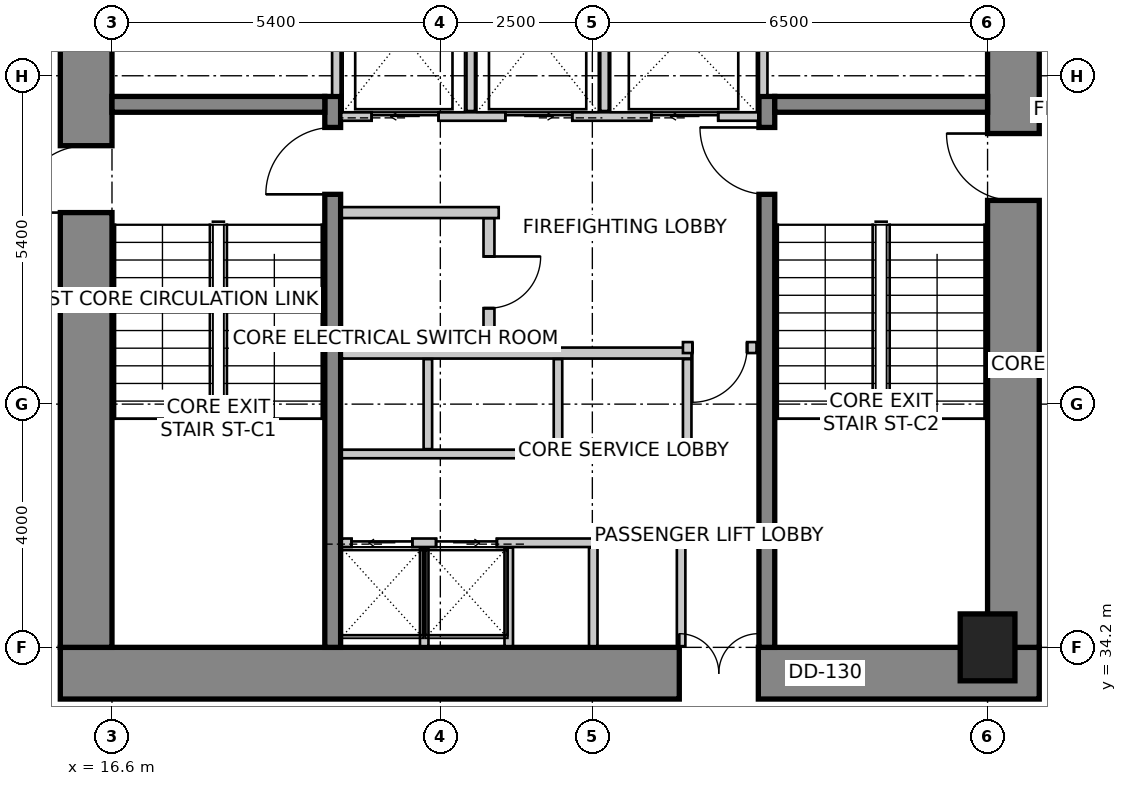
"""IFC4 building model, lengths in metres.
Left out: names, types, materials, properties, quantities, classifications, styles, units other than length and angle.
Written with IfcOpenShell. Run it as: python <this file> out.ifc"""

import sys

from ifc_helpers import new_model, si_unit, direction, frame, frame_2d, origin, origin_2d, place, context, subcontext, project, spatial, rectangle, extrude, source, transform, mapped, element, fill, save


model = new_model("IFC4")
c1 = context("Model", 3, precision=1e-05, world=origin(), true_north=direction((0.0, 1.0)))
c2 = subcontext(c1, "Body", "Model", "MODEL_VIEW")
j1 = project(units=[si_unit("LENGTHUNIT", "METRE"), si_unit("PLANEANGLEUNIT", "RADIAN")], contexts=[c1])
p1 = place(None, origin())
s1 = spatial("IfcSite", under=j1, at=p1, CompositionType="ELEMENT")
p2 = place(p1, origin())
s2 = spatial("IfcBuilding", under=s1, at=p2, CompositionType="ELEMENT")
p3 = place(p2, frame((0.0, 0.0, 51.0)))
s3 = spatial("IfcBuildingStorey", under=s2, at=p3, CompositionType="ELEMENT", Elevation=51.0)
p4 = place(p3, frame((15.75, 33.775, 0.0), z_axis=(0.0, 0.0, 1.0), x_axis=(1.0, 0.0, 0.0)))
e1 = element("IfcWall", 1, at=p4, inside=s3, PredefinedType="SHEAR", context=c2, shape_type="SweptSolid", body=[
    extrude(rectangle(XDim=16.1, YDim=0.85, at=frame_2d((8.05, 0.0))), origin(), (0.0, 0.0, 1.0), 4.0),
])
m1 = source(origin(), c2, "Body", "SweptSolid", [
    extrude(rectangle(XDim=1.3, YDim=2.15, at=frame_2d((0.65, 1.075))), frame((0.0, 0.435, 0.0), z_axis=(0.0, -1.0, 0.0), x_axis=(1.0, 0.0, 0.0)), (0.0, 0.0, 1.0), 0.87),
])
p5 = place(p4, frame((10.18, 0.0, 0.0)))
e2 = element("IfcOpeningElement", 2, at=p5, cuts=e1, PredefinedType="OPENING", context=c2, shape_type="MappedRepresentation", body=[
    mapped(m1, transform((0.0, 0.0, 0.0), scale=1.0)),
])
p6 = place(p3, frame((16.175, 34.2, 0.0), z_axis=(0.0, 0.0, 1.0), x_axis=(0.0, 1.0, 0.0)))
e3 = element("IfcWall", 3, at=p6, inside=s3, PredefinedType="SHEAR", context=c2, shape_type="SweptSolid", body=[
    extrude(rectangle(XDim=11.4, YDim=0.85, at=frame_2d((5.7, 0.0))), origin(), (0.0, 0.0, 1.0), 4.0),
])
m2 = source(origin(), c2, "Body", "SweptSolid", [
    extrude(rectangle(XDim=1.1, YDim=2.15, at=frame_2d((0.55, 1.075))), frame((0.0, 0.435, 0.0), z_axis=(0.0, -1.0, 0.0), x_axis=(1.0, 0.0, 0.0)), (0.0, 0.0, 1.0), 0.87),
])
p7 = place(p6, frame((7.15, 0.0, 0.0)))
e4 = element("IfcOpeningElement", 4, at=p7, cuts=e3, PredefinedType="OPENING", context=c2, shape_type="MappedRepresentation", body=[
    mapped(m2, transform((0.0, 0.0, 0.0), scale=1.0)),
])
p8 = place(p3, frame((31.425, 34.2, 0.0), z_axis=(0.0, 0.0, 1.0), x_axis=(0.0, 1.0, 0.0)))
e5 = element("IfcWall", 5, at=p8, inside=s3, PredefinedType="SHEAR", context=c2, shape_type="SweptSolid", body=[
    extrude(rectangle(XDim=11.4, YDim=0.85, at=frame_2d((5.7, 0.0))), origin(), (0.0, 0.0, 1.0), 4.0),
])
p9 = place(p8, frame((7.35, 0.0, 0.0)))
e6 = element("IfcOpeningElement", 6, at=p9, cuts=e5, PredefinedType="OPENING", context=c2, shape_type="MappedRepresentation", body=[
    mapped(m2, transform((0.0, 0.0, 0.0), scale=1.0)),
])
p10 = place(p3, frame((20.23, 34.2, 0.0), z_axis=(0.0, 0.0, 1.0), x_axis=(0.0, 1.0, 0.0)))
e7 = element("IfcWall", 7, at=p10, inside=s3, PredefinedType="SHEAR", context=c2, shape_type="SweptSolid", body=[
    extrude(rectangle(XDim=9.06, YDim=0.26, at=frame_2d((4.53, 0.0))), origin(), (0.0, 0.0, 1.0), 4.0),
])
m3 = source(origin(), c2, "Body", "SweptSolid", [
    extrude(rectangle(XDim=1.1, YDim=2.15, at=frame_2d((0.55, 1.075))), frame((0.0, 0.14, 0.0), z_axis=(0.0, -1.0, 0.0), x_axis=(1.0, 0.0, 0.0)), (0.0, 0.0, 1.0), 0.28),
])
p11 = place(p10, frame((7.45, 0.0, 0.0)))
e8 = element("IfcOpeningElement", 8, at=p11, cuts=e7, PredefinedType="OPENING", context=c2, shape_type="MappedRepresentation", body=[
    mapped(m3, transform((0.0, 0.0, 0.0), scale=1.0)),
])
p12 = place(p3, frame((27.37, 34.2, 0.0), z_axis=(0.0, 0.0, 1.0), x_axis=(0.0, 1.0, 0.0)))
e9 = element("IfcWall", 9, at=p12, inside=s3, PredefinedType="SHEAR", context=c2, shape_type="SweptSolid", body=[
    extrude(rectangle(XDim=9.06, YDim=0.26, at=frame_2d((4.53, 0.0))), origin(), (0.0, 0.0, 1.0), 4.0),
])
p13 = place(p12, frame((7.45, 0.0, 0.0)))
e10 = element("IfcOpeningElement", 10, at=p13, cuts=e9, PredefinedType="OPENING", context=c2, shape_type="MappedRepresentation", body=[
    mapped(m3, transform((0.0, 0.0, 0.0), scale=1.0)),
])
for number, where, z_axis, x_axis in (
    (11, (16.6, 43.13, 0.0), (0.0, 0.0, 1.0), (1.0, 0.0, 0.0)),
    (12, (27.5, 43.13, 0.0), (0.0, 0.0, 1.0), (1.0, 0.0, 0.0)),
):
    element("IfcWall", number, at=place(p3, frame(where, z_axis=z_axis, x_axis=x_axis)), inside=s3, PredefinedType="SHEAR", context=c2, shape_type="SweptSolid", body=[
        extrude(rectangle(XDim=3.5, YDim=0.26, at=frame_2d((1.75, 0.0))), origin(), (0.0, 0.0, 1.0), 4.0),
    ])
m4 = source(origin(), c2, "Body", "SweptSolid", [
    extrude(rectangle(XDim=0.9, YDim=1.1, at=origin_2d()), origin(), (0.0, 0.0, 1.0), 4.0),
])
p14 = place(p3, frame((31.0, 34.2, 0.0), z_axis=(0.0, 0.0, 1.0), x_axis=(1.0, 0.0, 0.0)))
e13 = element("IfcColumn", 13, at=p14, inside=s3, PredefinedType="COLUMN", context=c2, shape_type="MappedRepresentation", body=[
    mapped(m4, transform((0.0, 0.0, 0.0), scale=1.0)),
])
p15 = place(p3, frame((20.37, 42.93, 0.0), z_axis=(0.0, 0.0, 1.0), x_axis=(1.0, 0.0, 0.0)))
e14 = element("IfcWall", 14, at=p15, inside=s3, PredefinedType="SOLIDWALL", context=c2, shape_type="SweptSolid", body=[
    extrude(rectangle(XDim=6.86, YDim=0.14, at=frame_2d((3.43, 0.0))), origin(), (0.0, 0.0, 1.0), 3.75),
])
m5 = source(origin(), c2, "Body", "SweptSolid", [
    extrude(rectangle(XDim=1.1, YDim=2.15, at=frame_2d((0.55, 1.075))), frame((0.0, 0.08, 0.0), z_axis=(0.0, -1.0, 0.0), x_axis=(1.0, 0.0, 0.0)), (0.0, 0.0, 1.0), 0.16),
])
p16 = place(p15, frame((0.5, 0.0, 0.0)))
e15 = element("IfcOpeningElement", 15, at=p16, cuts=e14, PredefinedType="OPENING", context=c2, shape_type="MappedRepresentation", body=[
    mapped(m5, transform((0.0, 0.0, 0.0), scale=1.0)),
])
p17 = place(p15, frame((2.7, 0.0, 0.0)))
e16 = element("IfcOpeningElement", 16, at=p17, cuts=e14, PredefinedType="OPENING", context=c2, shape_type="MappedRepresentation", body=[
    mapped(m5, transform((0.0, 0.0, 0.0), scale=1.0)),
])
p18 = place(p15, frame((5.1, 0.0, 0.0)))
e17 = element("IfcOpeningElement", 17, at=p18, cuts=e14, PredefinedType="OPENING", context=c2, shape_type="MappedRepresentation", body=[
    mapped(m5, transform((0.0, 0.0, 0.0), scale=1.0)),
])
for number, where, z_axis, x_axis in (
    (18, (20.29, 43.28, 0.0), (0.0, 0.0, 1.0), (0.0, 1.0, 0.0)),
    (19, (27.31, 43.28, 0.0), (0.0, 0.0, 1.0), (0.0, 1.0, 0.0)),
):
    element("IfcWall", number, at=place(p3, frame(where, z_axis=z_axis, x_axis=x_axis)), inside=s3, PredefinedType="SOLIDWALL", context=c2, shape_type="SweptSolid", body=[
        extrude(rectangle(XDim=2.3, YDim=0.14, at=frame_2d((1.15, 0.0))), origin(), (0.0, 0.0, 1.0), 3.75),
    ])
for number, where, z_axis, x_axis in (
    (20, (22.5, 43.02, 0.0), (0.0, 0.0, 1.0), (0.0, 1.0, 0.0)),
    (21, (24.7, 43.02, 0.0), (0.0, 0.0, 1.0), (0.0, 1.0, 0.0)),
):
    element("IfcWall", number, at=place(p3, frame(where, z_axis=z_axis, x_axis=x_axis)), inside=s3, PredefinedType="SOLIDWALL", context=c2, shape_type="SweptSolid", body=[
        extrude(rectangle(XDim=2.56, YDim=0.14, at=frame_2d((1.28, 0.0))), origin(), (0.0, 0.0, 1.0), 3.75),
    ])
p19 = place(p3, frame((20.38, 35.92, 0.0), z_axis=(0.0, 0.0, 1.0), x_axis=(1.0, 0.0, 0.0)))
e22 = element("IfcWall", 22, at=p19, inside=s3, PredefinedType="SOLIDWALL", context=c2, shape_type="SweptSolid", body=[
    extrude(rectangle(XDim=5.65, YDim=0.14, at=frame_2d((2.825, 0.0))), origin(), (0.0, 0.0, 1.0), 3.75),
])
m6 = source(origin(), c2, "Body", "SweptSolid", [
    extrude(rectangle(XDim=1.0, YDim=2.15, at=frame_2d((0.5, 1.075))), frame((0.0, 0.08, 0.0), z_axis=(0.0, -1.0, 0.0), x_axis=(1.0, 0.0, 0.0)), (0.0, 0.0, 1.0), 0.16),
])
p20 = place(p19, frame((0.16, 0.0, 0.0)))
e23 = element("IfcOpeningElement", 23, at=p20, cuts=e22, PredefinedType="OPENING", context=c2, shape_type="MappedRepresentation", body=[
    mapped(m6, transform((0.0, 0.0, 0.0), scale=1.0)),
])
p21 = place(p19, frame((1.55, 0.0, 0.0)))
e24 = element("IfcOpeningElement", 24, at=p21, cuts=e22, PredefinedType="OPENING", context=c2, shape_type="MappedRepresentation", body=[
    mapped(m6, transform((0.0, 0.0, 0.0), scale=1.0)),
])
for number, where, z_axis, x_axis in (
    (25, (25.96, 34.22, 0.0), (0.0, 0.0, 1.0), (0.0, 1.0, 0.0)),
    (26, (21.735, 34.22, 0.0), (0.0, 0.0, 1.0), (0.0, 1.0, 0.0)),
    (27, (23.125, 34.22, 0.0), (0.0, 0.0, 1.0), (0.0, 1.0, 0.0)),
    (28, (24.515, 34.22, 0.0), (0.0, 0.0, 1.0), (0.0, 1.0, 0.0)),
):
    element("IfcWall", number, at=place(p3, frame(where, z_axis=z_axis, x_axis=x_axis)), inside=s3, PredefinedType="SOLIDWALL", context=c2, shape_type="SweptSolid", body=[
        extrude(rectangle(XDim=1.62, YDim=0.14, at=frame_2d((0.81, 0.0))), origin(), (0.0, 0.0, 1.0), 3.042),
    ])
p22 = place(p3, frame((20.38, 37.38, 0.0), z_axis=(0.0, 0.0, 1.0), x_axis=(1.0, 0.0, 0.0)))
e29 = element("IfcWall", 29, at=p22, inside=s3, PredefinedType="SOLIDWALL", context=c2, shape_type="SweptSolid", body=[
    extrude(rectangle(XDim=5.75, YDim=0.14, at=frame_2d((2.875, 0.0))), origin(), (0.0, 0.0, 1.0), 3.75),
])
p23 = place(p3, frame((20.38, 39.04, 0.0), z_axis=(0.0, 0.0, 1.0), x_axis=(1.0, 0.0, 0.0)))
e30 = element("IfcWall", 30, at=p23, inside=s3, PredefinedType="SOLIDWALL", context=c2, shape_type="SweptSolid", body=[
    extrude(rectangle(XDim=5.75, YDim=0.18, at=frame_2d((2.875, 0.0))), origin(), (0.0, 0.0, 1.0), 3.75),
])
for number, where, z_axis, x_axis in (
    (31, (26.06, 37.46, 0.0), (0.0, 0.0, 1.0), (0.0, 1.0, 0.0)),
    (32, (21.795, 37.46, 0.0), (0.0, 0.0, 1.0), (0.0, 1.0, 0.0)),
    (33, (23.935, 37.46, 0.0), (0.0, 0.0, 1.0), (0.0, 1.0, 0.0)),
):
    element("IfcWall", number, at=place(p3, frame(where, z_axis=z_axis, x_axis=x_axis)), inside=s3, PredefinedType="SOLIDWALL", context=c2, shape_type="SweptSolid", body=[
        extrude(rectangle(XDim=1.48, YDim=0.14, at=frame_2d((0.74, 0.0))), origin(), (0.0, 0.0, 1.0), 3.75),
    ])
p24 = place(p3, frame((22.96, 41.35, 0.0), z_axis=(0.0, 0.0, 1.0), x_axis=(-1.0, 0.0, 0.0)))
e34 = element("IfcWall", 34, at=p24, inside=s3, PredefinedType="PARTITIONING", context=c2, shape_type="SweptSolid", body=[
    extrude(rectangle(XDim=2.58, YDim=0.18, at=frame_2d((1.29, 0.0))), origin(), (0.0, 0.0, 1.0), 3.75),
])
p25 = place(p3, frame((22.8, 41.256, 0.0), z_axis=(0.0, 0.0, 1.0), x_axis=(0.0, -1.0, 0.0)))
e35 = element("IfcWall", 35, at=p25, inside=s3, PredefinedType="PARTITIONING", context=c2, shape_type="SweptSolid", body=[
    extrude(rectangle(XDim=2.106, YDim=0.18, at=frame_2d((1.053, 0.0))), origin(), (0.0, 0.0, 1.0), 3.75),
])
m7 = source(origin(), c2, "Body", "SweptSolid", [
    extrude(rectangle(XDim=0.85, YDim=2.15, at=frame_2d((0.425, 1.075))), frame((0.0, 0.1, 0.0), z_axis=(0.0, -1.0, 0.0), x_axis=(1.0, 0.0, 0.0)), (0.0, 0.0, 1.0), 0.2),
])
p26 = place(p25, frame((0.628, 0.0, 0.0)))
e36 = element("IfcOpeningElement", 36, at=p26, cuts=e35, PredefinedType="OPENING", context=c2, shape_type="MappedRepresentation", body=[
    mapped(m7, transform((0.0, 0.0, 0.0), scale=1.0)),
])
p27 = place(p3, frame((27.2, 39.13, 0.0), z_axis=(0.0, 0.0, 1.0), x_axis=(-1.0, 0.0, 0.0)))
e37 = element("IfcWall", 37, at=p27, inside=s3, PredefinedType="PARTITIONING", context=c2, shape_type="SweptSolid", body=[
    extrude(rectangle(XDim=1.21, YDim=0.18, at=frame_2d((0.605, 0.0))), origin(), (0.0, 0.0, 1.0), 3.75),
])
m8 = source(origin(), c2, "Body", "SweptSolid", [
    extrude(rectangle(XDim=0.9, YDim=2.15, at=frame_2d((0.45, 1.075))), frame((0.0, 0.1, 0.0), z_axis=(0.0, -1.0, 0.0), x_axis=(1.0, 0.0, 0.0)), (0.0, 0.0, 1.0), 0.2),
])
p28 = place(p27, frame((0.155, 0.0, 0.0)))
e38 = element("IfcOpeningElement", 38, at=p28, cuts=e37, PredefinedType="OPENING", context=c2, shape_type="MappedRepresentation", body=[
    mapped(m8, transform((0.0, 0.0, 0.0), scale=1.0)),
])
m9 = source(origin(), c2, "Body", "SweptSolid", [
    extrude(rectangle(XDim=1.1, YDim=2.15, at=frame_2d((0.55, 1.075))), frame((0.0, 0.025, 0.0), z_axis=(0.0, -1.0, 0.0), x_axis=(1.0, 0.0, 0.0)), (0.0, 0.0, 1.0), 0.05),
])
p29 = place(p16, origin())
e39 = element("IfcDoor", 39, at=p29, inside=s3, OperationType="SLIDING_TO_LEFT", PredefinedType="DOOR", context=c2, shape_type="MappedRepresentation", body=[
    mapped(m9, transform((0.0, 0.0, 0.0), scale=1.0)),
])
fill(e15, e39)
p30 = place(p17, origin())
e40 = element("IfcDoor", 40, at=p30, inside=s3, OperationType="SLIDING_TO_RIGHT", PredefinedType="DOOR", context=c2, shape_type="MappedRepresentation", body=[
    mapped(m9, transform((0.0, 0.0, 0.0), scale=1.0)),
])
fill(e16, e40)
m10 = source(origin(), c2, "Body", "SweptSolid", [
    extrude(rectangle(XDim=1.1, YDim=2.15, at=frame_2d((0.55, 1.075))), frame((0.0, 0.025, 0.0), z_axis=(0.0, -1.0, 0.0), x_axis=(1.0, 0.0, 0.0)), (0.0, 0.0, 1.0), 0.05),
])
p31 = place(p18, origin())
e41 = element("IfcDoor", 41, at=p31, inside=s3, OperationType="SLIDING_TO_LEFT", PredefinedType="DOOR", context=c2, shape_type="MappedRepresentation", body=[
    mapped(m10, transform((0.0, 0.0, 0.0), scale=1.0)),
])
fill(e17, e41)
m11 = source(origin(), c2, "Body", "SweptSolid", [
    extrude(rectangle(XDim=1.0, YDim=2.15, at=frame_2d((0.5, 1.075))), frame((0.0, 0.025, 0.0), z_axis=(0.0, -1.0, 0.0), x_axis=(1.0, 0.0, 0.0)), (0.0, 0.0, 1.0), 0.05),
])
p32 = place(p20, origin())
e42 = element("IfcDoor", 42, at=p32, inside=s3, OperationType="SLIDING_TO_LEFT", PredefinedType="DOOR", context=c2, shape_type="MappedRepresentation", body=[
    mapped(m11, transform((0.0, 0.0, 0.0), scale=1.0)),
])
fill(e23, e42)
p33 = place(p21, origin())
e43 = element("IfcDoor", 43, at=p33, inside=s3, OperationType="SLIDING_TO_RIGHT", PredefinedType="DOOR", context=c2, shape_type="MappedRepresentation", body=[
    mapped(m11, transform((0.0, 0.0, 0.0), scale=1.0)),
])
fill(e24, e43)
m12 = source(origin(), c2, "Body", "SweptSolid", [
    extrude(rectangle(XDim=1.1, YDim=2.15, at=frame_2d((0.55, 1.075))), frame((0.0, 0.025, 0.0), z_axis=(0.0, -1.0, 0.0), x_axis=(1.0, 0.0, 0.0)), (0.0, 0.0, 1.0), 0.05),
])
p34 = place(p11, origin())
e44 = element("IfcDoor", 44, at=p34, inside=s3, OperationType="SINGLE_SWING_LEFT", PredefinedType="DOOR", context=c2, shape_type="MappedRepresentation", body=[
    mapped(m12, transform((0.0, 0.0, 0.0), scale=1.0)),
])
fill(e8, e44)
p35 = place(p13, origin())
e45 = element("IfcDoor", 45, at=p35, inside=s3, OperationType="SINGLE_SWING_RIGHT", PredefinedType="DOOR", context=c2, shape_type="MappedRepresentation", body=[
    mapped(m12, transform((0.0, 0.0, 0.0), scale=1.0)),
])
fill(e10, e45)
p36 = place(p7, origin())
e46 = element("IfcDoor", 46, at=p36, inside=s3, OperationType="SINGLE_SWING_LEFT", PredefinedType="DOOR", context=c2, shape_type="MappedRepresentation", body=[
    mapped(m12, transform((0.0, 0.0, 0.0), scale=1.0)),
])
fill(e4, e46)
p37 = place(p9, origin())
e47 = element("IfcDoor", 47, at=p37, inside=s3, OperationType="SINGLE_SWING_RIGHT", PredefinedType="DOOR", context=c2, shape_type="MappedRepresentation", body=[
    mapped(m12, transform((0.0, 0.0, 0.0), scale=1.0)),
])
fill(e6, e47)
m13 = source(origin(), c2, "Body", "SweptSolid", [
    extrude(rectangle(XDim=1.3, YDim=2.15, at=frame_2d((0.65, 1.075))), frame((0.0, 0.025, 0.0), z_axis=(0.0, -1.0, 0.0), x_axis=(1.0, 0.0, 0.0)), (0.0, 0.0, 1.0), 0.05),
])
p38 = place(p5, origin())
e48 = element("IfcDoor", 48, at=p38, inside=s3, OperationType="DOUBLE_DOOR_SINGLE_SWING", PredefinedType="DOOR", context=c2, shape_type="MappedRepresentation", body=[
    mapped(m13, transform((0.0, 0.0, 0.0), scale=1.0)),
])
fill(e2, e48)
m14 = source(origin(), c2, "Body", "SweptSolid", [
    extrude(rectangle(XDim=0.85, YDim=2.15, at=frame_2d((0.425, 1.075))), frame((0.0, 0.025, 0.0), z_axis=(0.0, -1.0, 0.0), x_axis=(1.0, 0.0, 0.0)), (0.0, 0.0, 1.0), 0.05),
])
p39 = place(p26, origin())
e49 = element("IfcDoor", 49, at=p39, inside=s3, OperationType="SINGLE_SWING_LEFT", PredefinedType="DOOR", context=c2, shape_type="MappedRepresentation", body=[
    mapped(m14, transform((0.0, 0.0, 0.0), scale=1.0)),
])
fill(e36, e49)
m15 = source(origin(), c2, "Body", "SweptSolid", [
    extrude(rectangle(XDim=0.9, YDim=2.15, at=frame_2d((0.45, 1.075))), frame((0.0, 0.025, 0.0), z_axis=(0.0, -1.0, 0.0), x_axis=(1.0, 0.0, 0.0)), (0.0, 0.0, 1.0), 0.05),
])
p40 = place(p28, origin())
e50 = element("IfcDoor", 50, at=p40, inside=s3, OperationType="SINGLE_SWING_RIGHT", PredefinedType="DOOR", context=c2, shape_type="MappedRepresentation", body=[
    mapped(m15, transform((0.0, 0.0, 0.0), scale=1.0)),
])
fill(e38, e50)
save(model, sys.argv[1])
